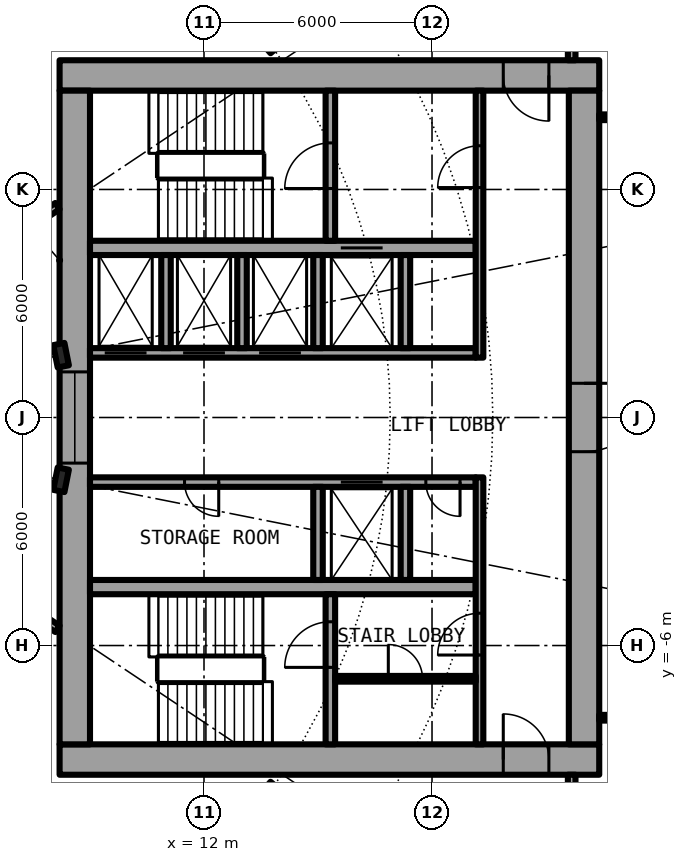
"""IFC4 building model, lengths in metres.
Left out: names, types, materials, properties, quantities, classifications, styles, units other than length and angle.
Written with IfcOpenShell. Run it as: python <this file> out.ifc"""

import sys

from ifc_helpers import new_model, si_unit, direction, frame, frame_2d, origin, origin_2d, place, context, subcontext, project, spatial, rectangle, i_section, extrude, element, fill, save


model = new_model("IFC4")
c1 = context("Model", 3, precision=1e-05, world=origin(), true_north=direction((0.0, 1.0)))
c2 = subcontext(c1, "Body", "Model", "MODEL_VIEW")
j1 = project(units=[si_unit("LENGTHUNIT", "METRE"), si_unit("PLANEANGLEUNIT", "RADIAN")], contexts=[c1])
p1 = place(None, origin())
s1 = spatial("IfcSite", under=j1, at=p1, CompositionType="ELEMENT")
p2 = place(p1, origin())
s2 = spatial("IfcBuilding", under=s1, at=p2, CompositionType="ELEMENT")
p3 = place(p2, frame((0.0, 0.0, 18.3)))
s3 = spatial("IfcBuildingStorey", under=s2, at=p3, CompositionType="ELEMENT", Elevation=18.3)
for number, where, z_axis, x_axis in (
    (1, (8.239, 1.639, 0.0), (0.0, 0.0, 1.0), (0.981, 0.195, 0.0)),
    (2, (8.239, -1.639, 0.0), (0.0, 0.0, 1.0), (0.981, -0.195, 0.0)),
):
    element("IfcColumn", number, at=place(p3, frame(where, z_axis=z_axis, x_axis=x_axis)), inside=s3, PredefinedType="COLUMN", context=c2, shape_type="SweptSolid", body=[
        extrude(i_section(OverallWidth=0.3, OverallDepth=0.6, WebThickness=0.015, FlangeThickness=0.03, FilletRadius=0.027, at=origin_2d()), origin(), (0.0, 0.0, 1.0), 4.5),
    ])
p4 = place(p3, frame((22.4, 9.0, 0.0), z_axis=(0.0, 0.0, 1.0), x_axis=(-1.0, 0.0, 0.0)))
e3 = element("IfcWall", 3, at=p4, inside=s3, PredefinedType="SHEAR", context=c2, shape_type="SweptSolid", body=[
    extrude(rectangle(XDim=14.2, YDim=0.8, at=frame_2d((7.1, 0.0))), origin(), (0.0, 0.0, 1.0), 4.5),
])
p5 = place(p4, frame((1.325, 0.0, 0.0)))
e4 = element("IfcOpeningElement", 4, at=p5, cuts=e3, PredefinedType="OPENING", context=c2, shape_type="SweptSolid", body=[
    extrude(rectangle(XDim=1.2, YDim=2.3, at=frame_2d((0.6, 1.15))), frame((0.0, 0.41, 0.0), z_axis=(0.0, -1.0, 0.0), x_axis=(1.0, 0.0, 0.0)), (0.0, 0.0, 1.0), 0.82),
])
p6 = place(p3, frame((8.2, -9.0, 0.0), z_axis=(0.0, 0.0, 1.0), x_axis=(1.0, 0.0, 0.0)))
e5 = element("IfcWall", 5, at=p6, inside=s3, PredefinedType="SHEAR", context=c2, shape_type="SweptSolid", body=[
    extrude(rectangle(XDim=14.2, YDim=0.8, at=frame_2d((7.1, 0.0))), origin(), (0.0, 0.0, 1.0), 4.5),
])
p7 = place(p6, frame((11.675, 0.0, 0.0)))
e6 = element("IfcOpeningElement", 6, at=p7, cuts=e5, PredefinedType="OPENING", context=c2, shape_type="SweptSolid", body=[
    extrude(rectangle(XDim=1.2, YDim=2.3, at=frame_2d((0.6, 1.15))), frame((0.0, 0.41, 0.0), z_axis=(0.0, -1.0, 0.0), x_axis=(1.0, 0.0, 0.0)), (0.0, 0.0, 1.0), 0.82),
])
p8 = place(p3, frame((22.0, 8.6, 0.0), z_axis=(0.0, 0.0, 1.0), x_axis=(0.0, -1.0, 0.0)))
e7 = element("IfcWall", 7, at=p8, inside=s3, PredefinedType="SHEAR", context=c2, shape_type="SweptSolid", body=[
    extrude(rectangle(XDim=17.2, YDim=0.8, at=frame_2d((8.6, 0.0))), origin(), (0.0, 0.0, 1.0), 4.5),
])
p9 = place(p8, frame((7.7, 0.0, 0.0)))
e8 = element("IfcOpeningElement", 8, at=p9, cuts=e7, PredefinedType="OPENING", context=c2, shape_type="SweptSolid", body=[
    extrude(rectangle(XDim=1.8, YDim=2.3, at=frame_2d((0.9, 1.15))), frame((0.0, 0.41, 0.0), z_axis=(0.0, -1.0, 0.0), x_axis=(1.0, 0.0, 0.0)), (0.0, 0.0, 1.0), 0.82),
])
p10 = place(p3, frame((8.6, -8.6, 0.0), z_axis=(0.0, 0.0, 1.0), x_axis=(0.0, 1.0, 0.0)))
e9 = element("IfcWall", 9, at=p10, inside=s3, PredefinedType="SHEAR", context=c2, shape_type="SweptSolid", body=[
    extrude(rectangle(XDim=17.2, YDim=0.8, at=frame_2d((8.6, 0.0))), origin(), (0.0, 0.0, 1.0), 4.5),
])
p11 = place(p10, frame((7.4, 0.0, 0.1)))
e10 = element("IfcOpeningElement", 10, at=p11, cuts=e9, PredefinedType="OPENING", context=c2, shape_type="SweptSolid", body=[
    extrude(rectangle(XDim=2.4, YDim=2.2, at=frame_2d((1.2, 1.1))), frame((0.0, 0.41, 0.0), z_axis=(0.0, -1.0, 0.0), x_axis=(1.0, 0.0, 0.0)), (0.0, 0.0, 1.0), 0.82),
])
p12 = place(p3, frame((9.0, 1.7, 0.0), z_axis=(0.0, 0.0, 1.0), x_axis=(1.0, 0.0, 0.0)))
e11 = element("IfcWall", 11, at=p12, inside=s3, PredefinedType="SHEAR", context=c2, shape_type="SweptSolid", body=[
    extrude(rectangle(XDim=10.15, YDim=0.25, at=frame_2d((5.075, 0.0))), origin(), (0.0, 0.0, 1.0), 4.5),
])
p13 = place(p12, frame((0.387, 0.0, 0.0)))
e12 = element("IfcOpeningElement", 12, at=p13, cuts=e11, PredefinedType="OPENING", context=c2, shape_type="SweptSolid", body=[
    extrude(rectangle(XDim=1.1, YDim=2.3, at=frame_2d((0.55, 1.15))), frame((0.0, 0.135, 0.0), z_axis=(0.0, -1.0, 0.0), x_axis=(1.0, 0.0, 0.0)), (0.0, 0.0, 1.0), 0.27),
])
p14 = place(p12, frame((2.45, 0.0, 0.0)))
e13 = element("IfcOpeningElement", 13, at=p14, cuts=e11, PredefinedType="OPENING", context=c2, shape_type="SweptSolid", body=[
    extrude(rectangle(XDim=1.1, YDim=2.3, at=frame_2d((0.55, 1.15))), frame((0.0, 0.135, 0.0), z_axis=(0.0, -1.0, 0.0), x_axis=(1.0, 0.0, 0.0)), (0.0, 0.0, 1.0), 0.27),
])
p15 = place(p12, frame((4.45, 0.0, 0.0)))
e14 = element("IfcOpeningElement", 14, at=p15, cuts=e11, PredefinedType="OPENING", context=c2, shape_type="SweptSolid", body=[
    extrude(rectangle(XDim=1.1, YDim=2.3, at=frame_2d((0.55, 1.15))), frame((0.0, 0.135, 0.0), z_axis=(0.0, -1.0, 0.0), x_axis=(1.0, 0.0, 0.0)), (0.0, 0.0, 1.0), 0.27),
])
p16 = place(p3, frame((9.0, 4.462, 0.0), z_axis=(0.0, 0.0, 1.0), x_axis=(1.0, 0.0, 0.0)))
e15 = element("IfcWall", 15, at=p16, inside=s3, PredefinedType="SHEAR", context=c2, shape_type="SweptSolid", body=[
    extrude(rectangle(XDim=10.15, YDim=0.375, at=frame_2d((5.075, 0.0))), origin(), (0.0, 0.0, 1.0), 4.5),
])
p17 = place(p16, frame((6.6, 0.0, 0.0)))
e16 = element("IfcOpeningElement", 16, at=p17, cuts=e15, PredefinedType="OPENING", context=c2, shape_type="SweptSolid", body=[
    extrude(rectangle(XDim=1.1, YDim=2.3, at=frame_2d((0.55, 1.15))), frame((0.0, 0.198, 0.0), z_axis=(0.0, -1.0, 0.0), x_axis=(1.0, 0.0, 0.0)), (0.0, 0.0, 1.0), 0.395),
])
p18 = place(p3, frame((15.325, 4.65, 0.0), z_axis=(0.0, 0.0, 1.0), x_axis=(0.0, 1.0, 0.0)))
e17 = element("IfcWall", 17, at=p18, inside=s3, PredefinedType="SHEAR", context=c2, shape_type="SweptSolid", body=[
    extrude(rectangle(XDim=3.95, YDim=0.25, at=frame_2d((1.975, 0.0))), origin(), (0.0, 0.0, 1.0), 4.5),
])
p19 = place(p18, frame((1.375, 0.0, 0.0)))
e18 = element("IfcOpeningElement", 18, at=p19, cuts=e17, PredefinedType="OPENING", context=c2, shape_type="SweptSolid", body=[
    extrude(rectangle(XDim=1.2, YDim=2.3, at=frame_2d((0.6, 1.15))), frame((0.0, 0.135, 0.0), z_axis=(0.0, -1.0, 0.0), x_axis=(1.0, 0.0, 0.0)), (0.0, 0.0, 1.0), 0.27),
])
for number, where, z_axis, x_axis in (
    (19, (15.0, 1.825, 0.0), (0.0, 0.0, 1.0), (0.0, 1.0, 0.0)),
    (20, (17.3, 1.825, 0.0), (0.0, 0.0, 1.0), (0.0, 1.0, 0.0)),
):
    element("IfcWall", number, at=place(p3, frame(where, z_axis=z_axis, x_axis=x_axis)), inside=s3, PredefinedType="SOLIDWALL", context=c2, shape_type="SweptSolid", body=[
        extrude(rectangle(XDim=2.45, YDim=0.25, at=frame_2d((1.225, 0.0))), origin(), (0.0, 0.0, 1.0), 4.15),
    ])
p20 = place(p3, frame((19.25, 1.575, 0.0), z_axis=(0.0, 0.0, 1.0), x_axis=(0.0, 1.0, 0.0)))
e21 = element("IfcWall", 21, at=p20, inside=s3, PredefinedType="SOLIDWALL", context=c2, shape_type="SweptSolid", body=[
    extrude(rectangle(XDim=7.025, YDim=0.2, at=frame_2d((3.513, 0.0))), origin(), (0.0, 0.0, 1.0), 4.15),
])
p21 = place(p20, frame((4.475, 0.0, 0.0)))
e22 = element("IfcOpeningElement", 22, at=p21, cuts=e21, PredefinedType="OPENING", context=c2, shape_type="SweptSolid", body=[
    extrude(rectangle(XDim=1.1, YDim=2.3, at=frame_2d((0.55, 1.15))), frame((0.0, 0.11, 0.0), z_axis=(0.0, -1.0, 0.0), x_axis=(1.0, 0.0, 0.0)), (0.0, 0.0, 1.0), 0.22),
])
p22 = place(p3, frame((19.15, -1.7, 0.0), z_axis=(0.0, 0.0, 1.0), x_axis=(-1.0, 0.0, 0.0)))
e23 = element("IfcWall", 23, at=p22, inside=s3, PredefinedType="SHEAR", context=c2, shape_type="SweptSolid", body=[
    extrude(rectangle(XDim=10.15, YDim=0.25, at=frame_2d((5.075, 0.0))), origin(), (0.0, 0.0, 1.0), 4.5),
])
p23 = place(p22, frame((2.45, 0.0, 0.0)))
e24 = element("IfcOpeningElement", 24, at=p23, cuts=e23, PredefinedType="OPENING", context=c2, shape_type="SweptSolid", body=[
    extrude(rectangle(XDim=1.1, YDim=2.3, at=frame_2d((0.55, 1.15))), frame((0.0, 0.135, 0.0), z_axis=(0.0, -1.0, 0.0), x_axis=(1.0, 0.0, 0.0)), (0.0, 0.0, 1.0), 0.27),
])
p24 = place(p22, frame((6.762, 0.0, 0.0)))
e25 = element("IfcOpeningElement", 25, at=p24, cuts=e23, PredefinedType="OPENING", context=c2, shape_type="SweptSolid", body=[
    extrude(rectangle(XDim=0.9, YDim=2.3, at=frame_2d((0.45, 1.15))), frame((0.0, 0.135, 0.0), z_axis=(0.0, -1.0, 0.0), x_axis=(1.0, 0.0, 0.0)), (0.0, 0.0, 1.0), 0.27),
])
p25 = place(p22, frame((0.413, 0.0, 0.0)))
e26 = element("IfcOpeningElement", 26, at=p25, cuts=e23, PredefinedType="OPENING", context=c2, shape_type="SweptSolid", body=[
    extrude(rectangle(XDim=0.9, YDim=2.3, at=frame_2d((0.45, 1.15))), frame((0.0, 0.135, 0.0), z_axis=(0.0, -1.0, 0.0), x_axis=(1.0, 0.0, 0.0)), (0.0, 0.0, 1.0), 0.27),
])
p26 = place(p3, frame((9.0, -4.462, 0.0), z_axis=(0.0, 0.0, 1.0), x_axis=(1.0, 0.0, 0.0)))
e27 = element("IfcWall", 27, at=p26, inside=s3, PredefinedType="SHEAR", context=c2, shape_type="SweptSolid", body=[
    extrude(rectangle(XDim=10.15, YDim=0.375, at=frame_2d((5.075, 0.0))), origin(), (0.0, 0.0, 1.0), 4.5),
])
p27 = place(p3, frame((15.325, -8.6, 0.0), z_axis=(0.0, 0.0, 1.0), x_axis=(0.0, 1.0, 0.0)))
e28 = element("IfcWall", 28, at=p27, inside=s3, PredefinedType="SHEAR", context=c2, shape_type="SweptSolid", body=[
    extrude(rectangle(XDim=3.95, YDim=0.25, at=frame_2d((1.975, 0.0))), origin(), (0.0, 0.0, 1.0), 4.5),
])
p28 = place(p27, frame((2.025, 0.0, 0.0)))
e29 = element("IfcOpeningElement", 29, at=p28, cuts=e28, PredefinedType="OPENING", context=c2, shape_type="SweptSolid", body=[
    extrude(rectangle(XDim=1.2, YDim=2.3, at=frame_2d((0.6, 1.15))), frame((0.0, 0.135, 0.0), z_axis=(0.0, -1.0, 0.0), x_axis=(1.0, 0.0, 0.0)), (0.0, 0.0, 1.0), 0.27),
])
for number, where, z_axis, x_axis in (
    (30, (15.0, -1.825, 0.0), (0.0, 0.0, 1.0), (0.0, -1.0, 0.0)),
    (31, (17.3, -1.825, 0.0), (0.0, 0.0, 1.0), (0.0, -1.0, 0.0)),
):
    element("IfcWall", number, at=place(p3, frame(where, z_axis=z_axis, x_axis=x_axis)), inside=s3, PredefinedType="SOLIDWALL", context=c2, shape_type="SweptSolid", body=[
        extrude(rectangle(XDim=2.45, YDim=0.25, at=frame_2d((1.225, 0.0))), origin(), (0.0, 0.0, 1.0), 4.15),
    ])
p29 = place(p3, frame((19.25, -8.6, 0.0), z_axis=(0.0, 0.0, 1.0), x_axis=(0.0, 1.0, 0.0)))
e32 = element("IfcWall", 32, at=p29, inside=s3, PredefinedType="SOLIDWALL", context=c2, shape_type="SweptSolid", body=[
    extrude(rectangle(XDim=7.025, YDim=0.2, at=frame_2d((3.513, 0.0))), origin(), (0.0, 0.0, 1.0), 4.15),
])
p30 = place(p29, frame((2.35, 0.0, 0.0)))
e33 = element("IfcOpeningElement", 33, at=p30, cuts=e32, PredefinedType="OPENING", context=c2, shape_type="SweptSolid", body=[
    extrude(rectangle(XDim=1.1, YDim=2.3, at=frame_2d((0.55, 1.15))), frame((0.0, 0.11, 0.0), z_axis=(0.0, -1.0, 0.0), x_axis=(1.0, 0.0, 0.0)), (0.0, 0.0, 1.0), 0.22),
])
for number, where, z_axis, x_axis in (
    (34, (11.0, 1.825, 0.0), (0.0, 0.0, 1.0), (0.0, 1.0, 0.0)),
    (35, (13.0, 1.825, 0.0), (0.0, 0.0, 1.0), (0.0, 1.0, 0.0)),
):
    element("IfcWall", number, at=place(p3, frame(where, z_axis=z_axis, x_axis=x_axis)), inside=s3, PredefinedType="SOLIDWALL", context=c2, shape_type="SweptSolid", body=[
        extrude(rectangle(XDim=2.45, YDim=0.25, at=frame_2d((1.225, 0.0))), origin(), (0.0, 0.0, 1.0), 4.15),
    ])
p31 = place(p3, frame((15.45, -6.875, 0.0), z_axis=(0.0, 0.0, 1.0), x_axis=(1.0, 0.0, 0.0)))
e36 = element("IfcWall", 36, at=p31, inside=s3, PredefinedType="PARTITIONING", context=c2, shape_type="SweptSolid", body=[
    extrude(rectangle(XDim=3.7, YDim=0.15, at=frame_2d((1.85, 0.0))), origin(), (0.0, 0.0, 1.0), 4.15),
])
p32 = place(p31, frame((1.4, 0.0, 0.0)))
e37 = element("IfcOpeningElement", 37, at=p32, cuts=e36, PredefinedType="OPENING", context=c2, shape_type="SweptSolid", body=[
    extrude(rectangle(XDim=0.9, YDim=2.3, at=frame_2d((0.45, 1.15))), frame((0.0, 0.085, 0.0), z_axis=(0.0, -1.0, 0.0), x_axis=(1.0, 0.0, 0.0)), (0.0, 0.0, 1.0), 0.17),
])
for number, where, z_axis, x_axis in (
    (38, (22.4, -7.9, 0.0), (0.0, 0.0, 1.0), (1.0, 0.0, 0.0)),
    (39, (22.4, 7.9, 0.0), (0.0, 0.0, 1.0), (1.0, 0.0, 0.0)),
):
    element("IfcWall", number, at=place(p3, frame(where, z_axis=z_axis, x_axis=x_axis)), inside=s3, PredefinedType="PARTITIONING", context=c2, shape_type="SweptSolid", body=[
        extrude(rectangle(XDim=2.54, YDim=0.15, at=frame_2d((1.27, 0.0))), origin(), (0.0, 0.0, 1.0), 4.15),
    ])
for number, where, z_axis, x_axis in (
    (40, (21.675, -11.0, 0.0), (0.0, 0.0, 1.0), (0.0, 1.0, 0.0)),
    (41, (21.675, 9.4, 0.0), (0.0, 0.0, 1.0), (0.0, 1.0, 0.0)),
):
    element("IfcWall", number, at=place(p3, frame(where, z_axis=z_axis, x_axis=x_axis)), inside=s3, PredefinedType="PARTITIONING", context=c2, shape_type="SweptSolid", body=[
        extrude(rectangle(XDim=1.6, YDim=0.2, at=frame_2d((0.8, 0.0))), origin(), (0.0, 0.0, 1.0), 4.15),
    ])
p33 = place(p3, frame((11.349, -12.522, 0.0), z_axis=(0.0, 0.0, 1.0), x_axis=(0.653220956969, 0.757167340406, 0.0)))
e42 = element("IfcWall", 42, at=p33, inside=s3, PredefinedType="PARTITIONING", context=c2, shape_type="SweptSolid", body=[
    extrude(rectangle(XDim=3.793, YDim=0.2, at=frame_2d((1.896, 0.0))), origin(), (0.0, 0.0, 1.0), 4.15),
])
p34 = place(p3, frame((6.513, -4.472, 0.0), z_axis=(0.0, 0.0, 1.0), x_axis=(0.831417956244, -0.555647533996, 0.0)))
e43 = element("IfcWall", 43, at=p34, inside=s3, PredefinedType="PARTITIONING", context=c2, shape_type="SweptSolid", body=[
    extrude(rectangle(XDim=1.962, YDim=0.2, at=frame_2d((0.981, 0.0))), origin(), (0.0, 0.0, 1.0), 4.15),
])
p35 = place(p3, frame((3.638, -6.809, 0.0), z_axis=(0.0, 0.0, 1.0), x_axis=(0.471460365694, -0.881887251059, 0.0)))
e44 = element("IfcWall", 44, at=p35, inside=s3, PredefinedType="PARTITIONING", context=c2, shape_type="SweptSolid", body=[
    extrude(rectangle(XDim=9.18, YDim=0.2, at=frame_2d((4.59, 0.0))), origin(), (0.0, 0.0, 1.0), 4.15),
])
p36 = place(p3, frame((3.641, 6.807, 0.0), z_axis=(0.0, 0.0, 1.0), x_axis=(0.471428625665, 0.881904218667, 0.0)))
e45 = element("IfcWall", 45, at=p36, inside=s3, PredefinedType="PARTITIONING", context=c2, shape_type="SweptSolid", body=[
    extrude(rectangle(XDim=9.18, YDim=0.2, at=frame_2d((4.59, 0.0))), origin(), (0.0, 0.0, 1.0), 4.15),
])
p37 = place(p3, frame((6.513, 4.472, 0.0), z_axis=(0.0, 0.0, 1.0), x_axis=(0.831417956244, 0.555647533996, 0.0)))
e46 = element("IfcWall", 46, at=p37, inside=s3, PredefinedType="PARTITIONING", context=c2, shape_type="SweptSolid", body=[
    extrude(rectangle(XDim=1.962, YDim=0.2, at=frame_2d((0.981, 0.0))), origin(), (0.0, 0.0, 1.0), 4.15),
])
p38 = place(p3, frame((11.349, 12.522, 0.0), z_axis=(0.0, 0.0, 1.0), x_axis=(0.653220956969, -0.757167340406, 0.0)))
e47 = element("IfcWall", 47, at=p38, inside=s3, PredefinedType="PARTITIONING", context=c2, shape_type="SweptSolid", body=[
    extrude(rectangle(XDim=3.793, YDim=0.2, at=frame_2d((1.896, 0.0))), origin(), (0.0, 0.0, 1.0), 4.15),
])
p39 = place(p13, origin())
e48 = element("IfcDoor", 48, at=p39, inside=s3, OperationType="DOUBLE_DOOR_SLIDING", PredefinedType="DOOR", context=c2, shape_type="SweptSolid", body=[
    extrude(rectangle(XDim=1.1, YDim=2.3, at=frame_2d((0.55, 1.15))), frame((0.0, 0.025, 0.0), z_axis=(0.0, -1.0, 0.0), x_axis=(1.0, 0.0, 0.0)), (0.0, 0.0, 1.0), 0.05),
])
fill(e12, e48)
p40 = place(p14, origin())
e49 = element("IfcDoor", 49, at=p40, inside=s3, OperationType="DOUBLE_DOOR_SLIDING", PredefinedType="DOOR", context=c2, shape_type="SweptSolid", body=[
    extrude(rectangle(XDim=1.1, YDim=2.3, at=frame_2d((0.55, 1.15))), frame((0.0, 0.025, 0.0), z_axis=(0.0, -1.0, 0.0), x_axis=(1.0, 0.0, 0.0)), (0.0, 0.0, 1.0), 0.05),
])
fill(e13, e49)
p41 = place(p15, origin())
e50 = element("IfcDoor", 50, at=p41, inside=s3, OperationType="DOUBLE_DOOR_SLIDING", PredefinedType="DOOR", context=c2, shape_type="SweptSolid", body=[
    extrude(rectangle(XDim=1.1, YDim=2.3, at=frame_2d((0.55, 1.15))), frame((0.0, 0.025, 0.0), z_axis=(0.0, -1.0, 0.0), x_axis=(1.0, 0.0, 0.0)), (0.0, 0.0, 1.0), 0.05),
])
fill(e14, e50)
p42 = place(p17, origin())
e51 = element("IfcDoor", 51, at=p42, inside=s3, OperationType="DOUBLE_DOOR_SLIDING", PredefinedType="DOOR", context=c2, shape_type="SweptSolid", body=[
    extrude(rectangle(XDim=1.1, YDim=2.3, at=frame_2d((0.55, 1.15))), frame((0.0, 0.025, 0.0), z_axis=(0.0, -1.0, 0.0), x_axis=(1.0, 0.0, 0.0)), (0.0, 0.0, 1.0), 0.05),
])
fill(e16, e51)
p43 = place(p23, origin())
e52 = element("IfcDoor", 52, at=p43, inside=s3, OperationType="DOUBLE_DOOR_SLIDING", PredefinedType="DOOR", context=c2, shape_type="SweptSolid", body=[
    extrude(rectangle(XDim=1.1, YDim=2.3, at=frame_2d((0.55, 1.15))), frame((0.0, 0.025, 0.0), z_axis=(0.0, -1.0, 0.0), x_axis=(1.0, 0.0, 0.0)), (0.0, 0.0, 1.0), 0.05),
])
fill(e24, e52)
p44 = place(p24, origin())
e53 = element("IfcDoor", 53, at=p44, inside=s3, OperationType="SINGLE_SWING_LEFT", PredefinedType="DOOR", context=c2, shape_type="SweptSolid", body=[
    extrude(rectangle(XDim=0.9, YDim=2.3, at=frame_2d((0.45, 1.15))), frame((0.0, 0.025, 0.0), z_axis=(0.0, -1.0, 0.0), x_axis=(1.0, 0.0, 0.0)), (0.0, 0.0, 1.0), 0.05),
])
fill(e25, e53)
p45 = place(p25, origin())
e54 = element("IfcDoor", 54, at=p45, inside=s3, OperationType="SINGLE_SWING_RIGHT", PredefinedType="DOOR", context=c2, shape_type="SweptSolid", body=[
    extrude(rectangle(XDim=0.9, YDim=2.3, at=frame_2d((0.45, 1.15))), frame((0.0, 0.025, 0.0), z_axis=(0.0, -1.0, 0.0), x_axis=(1.0, 0.0, 0.0)), (0.0, 0.0, 1.0), 0.05),
])
fill(e26, e54)
p46 = place(p32, origin())
e55 = element("IfcDoor", 55, at=p46, inside=s3, OperationType="SINGLE_SWING_LEFT", PredefinedType="DOOR", context=c2, shape_type="SweptSolid", body=[
    extrude(rectangle(XDim=0.9, YDim=2.3, at=frame_2d((0.45, 1.15))), frame((0.0, 0.025, 0.0), z_axis=(0.0, -1.0, 0.0), x_axis=(1.0, 0.0, 0.0)), (0.0, 0.0, 1.0), 0.05),
])
fill(e37, e55)
p47 = place(p19, origin())
e56 = element("IfcDoor", 56, at=p47, inside=s3, OperationType="SINGLE_SWING_LEFT", PredefinedType="DOOR", context=c2, shape_type="SweptSolid", body=[
    extrude(rectangle(XDim=1.2, YDim=2.3, at=frame_2d((0.6, 1.15))), frame((0.0, 0.025, 0.0), z_axis=(0.0, -1.0, 0.0), x_axis=(1.0, 0.0, 0.0)), (0.0, 0.0, 1.0), 0.05),
])
fill(e18, e56)
p48 = place(p28, origin())
e57 = element("IfcDoor", 57, at=p48, inside=s3, OperationType="SINGLE_SWING_LEFT", PredefinedType="DOOR", context=c2, shape_type="SweptSolid", body=[
    extrude(rectangle(XDim=1.2, YDim=2.3, at=frame_2d((0.6, 1.15))), frame((0.0, 0.025, 0.0), z_axis=(0.0, -1.0, 0.0), x_axis=(1.0, 0.0, 0.0)), (0.0, 0.0, 1.0), 0.05),
])
fill(e29, e57)
p49 = place(p21, origin())
e58 = element("IfcDoor", 58, at=p49, inside=s3, OperationType="SINGLE_SWING_LEFT", PredefinedType="DOOR", context=c2, shape_type="SweptSolid", body=[
    extrude(rectangle(XDim=1.1, YDim=2.3, at=frame_2d((0.55, 1.15))), frame((0.0, 0.025, 0.0), z_axis=(0.0, -1.0, 0.0), x_axis=(1.0, 0.0, 0.0)), (0.0, 0.0, 1.0), 0.05),
])
fill(e22, e58)
p50 = place(p30, origin())
e59 = element("IfcDoor", 59, at=p50, inside=s3, OperationType="SINGLE_SWING_RIGHT", PredefinedType="DOOR", context=c2, shape_type="SweptSolid", body=[
    extrude(rectangle(XDim=1.1, YDim=2.3, at=frame_2d((0.55, 1.15))), frame((0.0, 0.025, 0.0), z_axis=(0.0, -1.0, 0.0), x_axis=(1.0, 0.0, 0.0)), (0.0, 0.0, 1.0), 0.05),
])
fill(e33, e59)
p51 = place(p5, origin())
e60 = element("IfcDoor", 60, at=p51, inside=s3, OperationType="SINGLE_SWING_RIGHT", PredefinedType="DOOR", context=c2, shape_type="SweptSolid", body=[
    extrude(rectangle(XDim=1.2, YDim=2.3, at=frame_2d((0.6, 1.15))), frame((0.0, 0.025, 0.0), z_axis=(0.0, -1.0, 0.0), x_axis=(1.0, 0.0, 0.0)), (0.0, 0.0, 1.0), 0.05),
])
fill(e4, e60)
p52 = place(p7, origin())
e61 = element("IfcDoor", 61, at=p52, inside=s3, OperationType="SINGLE_SWING_LEFT", PredefinedType="DOOR", context=c2, shape_type="SweptSolid", body=[
    extrude(rectangle(XDim=1.2, YDim=2.3, at=frame_2d((0.6, 1.15))), frame((0.0, 0.025, 0.0), z_axis=(0.0, -1.0, 0.0), x_axis=(1.0, 0.0, 0.0)), (0.0, 0.0, 1.0), 0.05),
])
fill(e6, e61)
p53 = place(p9, origin())
e62 = element("IfcDoor", 62, at=p53, inside=s3, OperationType="SINGLE_SWING_LEFT", PredefinedType="DOOR", context=c2, shape_type="SweptSolid", body=[
    extrude(rectangle(XDim=1.8, YDim=2.3, at=frame_2d((0.9, 1.15))), frame((0.0, 0.025, 0.0), z_axis=(0.0, -1.0, 0.0), x_axis=(1.0, 0.0, 0.0)), (0.0, 0.0, 1.0), 0.05),
])
fill(e8, e62)
p54 = place(p11, origin())
e63 = element("IfcWindow", 63, at=p54, inside=s3, PartitioningType="SINGLE_PANEL", PredefinedType="WINDOW", context=c2, shape_type="SweptSolid", body=[
    extrude(rectangle(XDim=2.4, YDim=2.2, at=frame_2d((1.2, 1.1))), frame((0.0, 0.03, 0.0), z_axis=(0.0, -1.0, 0.0), x_axis=(1.0, 0.0, 0.0)), (0.0, 0.0, 1.0), 0.06),
])
fill(e10, e63)
save(model, sys.argv[1])
